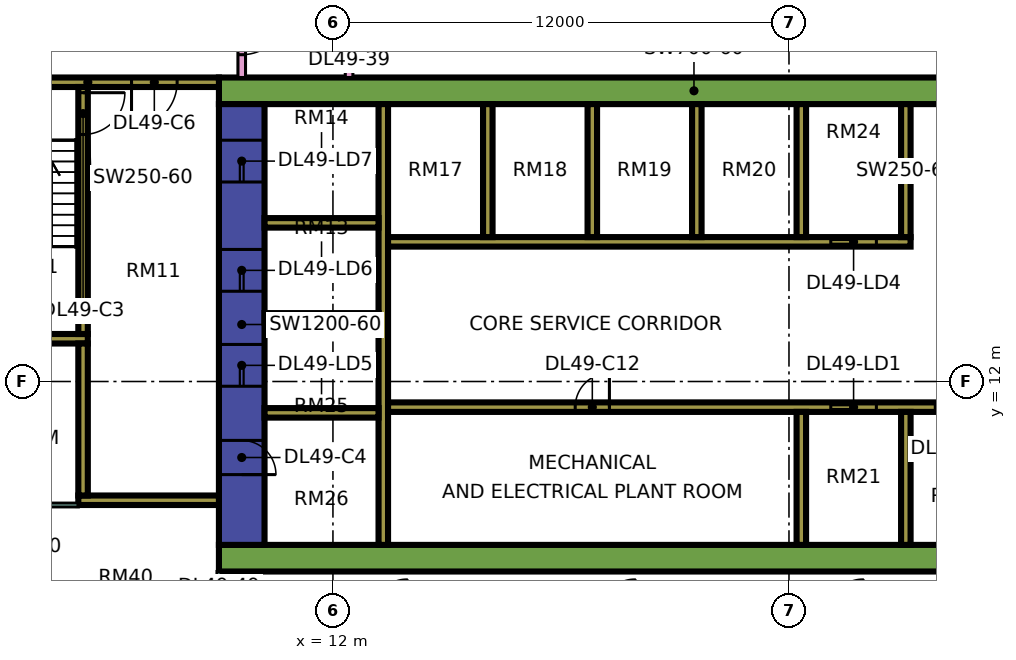
"""IFC4 building model, lengths in metres.
Left out: names, types, materials, properties, quantities, classifications, styles, units other than length and angle.
Written with IfcOpenShell. Run it as: python <this file> out.ifc"""

import sys

from ifc_helpers import new_model, si_unit, direction, frame, frame_2d, origin, place, context, subcontext, project, spatial, rectangle, extrude, element, fill, save


model = new_model("IFC4")
c1 = context("Model", 3, precision=1e-05, world=origin(), true_north=direction((0.0, 1.0)))
c2 = subcontext(c1, "Body", "Model", "MODEL_VIEW")
j1 = project(units=[si_unit("LENGTHUNIT", "METRE"), si_unit("PLANEANGLEUNIT", "RADIAN")], contexts=[c1])
p1 = place(None, origin())
s1 = spatial("IfcSite", under=j1, at=p1, CompositionType="ELEMENT")
p2 = place(p1, origin())
s2 = spatial("IfcBuilding", under=s1, at=p2, CompositionType="ELEMENT")
p3 = place(p2, frame((0.0, 0.0, 211.65)))
s3 = spatial("IfcBuildingStorey", under=s2, at=p3, CompositionType="ELEMENT", Elevation=211.65)
p4 = place(p3, frame((9.0, 7.35, 0.0), z_axis=(0.0, 0.0, 1.0), x_axis=(1.0, 0.0, 0.0)))
e1 = element("IfcWall", 1, at=p4, inside=s3, PredefinedType="SHEAR", context=c2, shape_type="SweptSolid", body=[
    extrude(rectangle(XDim=25.0, YDim=0.7, at=frame_2d((12.5, 0.0))), origin(), (0.0, 0.0, 1.0), 3.75),
])
p5 = place(p3, frame((9.0, 19.65, 0.0), z_axis=(0.0, 0.0, 1.0), x_axis=(1.0, 0.0, 0.0)))
e2 = element("IfcWall", 2, at=p5, inside=s3, PredefinedType="SHEAR", context=c2, shape_type="SweptSolid", body=[
    extrude(rectangle(XDim=25.0, YDim=0.7, at=frame_2d((12.5, 0.0))), origin(), (0.0, 0.0, 1.0), 3.75),
])
p6 = place(p5, frame((19.1, 0.0, 0.0)))
e3 = element("IfcOpeningElement", 3, at=p6, cuts=e2, PredefinedType="OPENING", context=c2, shape_type="SweptSolid", body=[
    extrude(rectangle(XDim=1.8, YDim=2.4, at=frame_2d((0.9, 1.2))), frame((0.0, 0.36, 0.0), z_axis=(0.0, -1.0, 0.0), x_axis=(1.0, 0.0, 0.0)), (0.0, 0.0, 1.0), 0.72),
])
p7 = place(p3, frame((9.6, 7.7, 0.0), z_axis=(0.0, 0.0, 1.0), x_axis=(0.0, 1.0, 0.0)))
e4 = element("IfcWall", 4, at=p7, inside=s3, PredefinedType="SHEAR", context=c2, shape_type="SweptSolid", body=[
    extrude(rectangle(XDim=11.6, YDim=1.2, at=frame_2d((5.8, 0.0))), origin(), (0.0, 0.0, 1.0), 3.75),
])
p8 = place(p7, frame((4.175, 0.0, 0.0)))
e5 = element("IfcOpeningElement", 5, at=p8, cuts=e4, PredefinedType="OPENING", context=c2, shape_type="SweptSolid", body=[
    extrude(rectangle(XDim=1.1, YDim=2.2, at=frame_2d((0.55, 1.1))), frame((0.0, 0.61, 0.0), z_axis=(0.0, -1.0, 0.0), x_axis=(1.0, 0.0, 0.0)), (0.0, 0.0, 1.0), 1.22),
])
p9 = place(p7, frame((6.675, 0.0, 0.0)))
e6 = element("IfcOpeningElement", 6, at=p9, cuts=e4, PredefinedType="OPENING", context=c2, shape_type="SweptSolid", body=[
    extrude(rectangle(XDim=1.1, YDim=2.2, at=frame_2d((0.55, 1.1))), frame((0.0, 0.61, 0.0), z_axis=(0.0, -1.0, 0.0), x_axis=(1.0, 0.0, 0.0)), (0.0, 0.0, 1.0), 1.22),
])
p10 = place(p7, frame((9.55, 0.0, 0.0)))
e7 = element("IfcOpeningElement", 7, at=p10, cuts=e4, PredefinedType="OPENING", context=c2, shape_type="SweptSolid", body=[
    extrude(rectangle(XDim=1.1, YDim=2.2, at=frame_2d((0.55, 1.1))), frame((0.0, 0.61, 0.0), z_axis=(0.0, -1.0, 0.0), x_axis=(1.0, 0.0, 0.0)), (0.0, 0.0, 1.0), 1.22),
])
p11 = place(p7, frame((1.85, 0.0, 0.0)))
e8 = element("IfcOpeningElement", 8, at=p11, cuts=e4, PredefinedType="OPENING", context=c2, shape_type="SweptSolid", body=[
    extrude(rectangle(XDim=0.9, YDim=2.1, at=frame_2d((0.45, 1.05))), frame((0.0, 0.61, 0.0), z_axis=(0.0, -1.0, 0.0), x_axis=(1.0, 0.0, 0.0)), (0.0, 0.0, 1.0), 1.22),
])
p12 = place(p3, frame((13.325, 7.7, 0.0), z_axis=(0.0, 0.0, 1.0), x_axis=(0.0, 1.0, 0.0)))
e9 = element("IfcWall", 9, at=p12, inside=s3, PredefinedType="SHEAR", context=c2, shape_type="SweptSolid", body=[
    extrude(rectangle(XDim=11.6, YDim=0.25, at=frame_2d((5.8, 0.0))), origin(), (0.0, 0.0, 1.0), 3.75),
])
p13 = place(p3, frame((13.45, 11.325, 0.0), z_axis=(0.0, 0.0, 1.0), x_axis=(1.0, 0.0, 0.0)))
e10 = element("IfcWall", 10, at=p13, inside=s3, PredefinedType="SHEAR", context=c2, shape_type="SweptSolid", body=[
    extrude(rectangle(XDim=19.85, YDim=0.25, at=frame_2d((9.925, 0.0))), origin(), (0.0, 0.0, 1.0), 3.75),
])
p14 = place(p13, frame((11.65, 0.0, 0.0)))
e11 = element("IfcOpeningElement", 11, at=p14, cuts=e10, PredefinedType="OPENING", context=c2, shape_type="SweptSolid", body=[
    extrude(rectangle(XDim=1.2, YDim=2.2, at=frame_2d((0.6, 1.1))), frame((0.0, 0.135, 0.0), z_axis=(0.0, -1.0, 0.0), x_axis=(1.0, 0.0, 0.0)), (0.0, 0.0, 1.0), 0.27),
])
p15 = place(p13, frame((14.4, 0.0, 0.0)))
e12 = element("IfcOpeningElement", 12, at=p15, cuts=e10, PredefinedType="OPENING", context=c2, shape_type="SweptSolid", body=[
    extrude(rectangle(XDim=1.2, YDim=2.2, at=frame_2d((0.6, 1.1))), frame((0.0, 0.135, 0.0), z_axis=(0.0, -1.0, 0.0), x_axis=(1.0, 0.0, 0.0)), (0.0, 0.0, 1.0), 0.27),
])
p16 = place(p13, frame((17.15, 0.0, 0.0)))
e13 = element("IfcOpeningElement", 13, at=p16, cuts=e10, PredefinedType="OPENING", context=c2, shape_type="SweptSolid", body=[
    extrude(rectangle(XDim=1.2, YDim=2.2, at=frame_2d((0.6, 1.1))), frame((0.0, 0.135, 0.0), z_axis=(0.0, -1.0, 0.0), x_axis=(1.0, 0.0, 0.0)), (0.0, 0.0, 1.0), 0.27),
])
p17 = place(p13, frame((4.925, 0.0, 0.0)))
e14 = element("IfcOpeningElement", 14, at=p17, cuts=e10, PredefinedType="OPENING", context=c2, shape_type="SweptSolid", body=[
    extrude(rectangle(XDim=0.9, YDim=2.1, at=frame_2d((0.45, 1.05))), frame((0.0, 0.135, 0.0), z_axis=(0.0, -1.0, 0.0), x_axis=(1.0, 0.0, 0.0)), (0.0, 0.0, 1.0), 0.27),
])
p18 = place(p3, frame((13.45, 15.675, 0.0), z_axis=(0.0, 0.0, 1.0), x_axis=(1.0, 0.0, 0.0)))
e15 = element("IfcWall", 15, at=p18, inside=s3, PredefinedType="SHEAR", context=c2, shape_type="SweptSolid", body=[
    extrude(rectangle(XDim=13.75, YDim=0.25, at=frame_2d((6.875, 0.0))), origin(), (0.0, 0.0, 1.0), 3.75),
])
p19 = place(p18, frame((11.65, 0.0, 0.0)))
e16 = element("IfcOpeningElement", 16, at=p19, cuts=e15, PredefinedType="OPENING", context=c2, shape_type="SweptSolid", body=[
    extrude(rectangle(XDim=1.2, YDim=2.2, at=frame_2d((0.6, 1.1))), frame((0.0, 0.135, 0.0), z_axis=(0.0, -1.0, 0.0), x_axis=(1.0, 0.0, 0.0)), (0.0, 0.0, 1.0), 0.27),
])
for number, where, z_axis, x_axis in (
    (17, (10.2, 11.175, 0.0), (0.0, 0.0, 1.0), (1.0, 0.0, 0.0)),
    (18, (10.2, 13.675, 0.0), (0.0, 0.0, 1.0), (1.0, 0.0, 0.0)),
    (19, (10.2, 16.175, 0.0), (0.0, 0.0, 1.0), (1.0, 0.0, 0.0)),
):
    element("IfcWall", number, at=place(p3, frame(where, z_axis=z_axis, x_axis=x_axis)), inside=s3, PredefinedType="SHEAR", context=c2, shape_type="SweptSolid", body=[
        extrude(rectangle(XDim=3.0, YDim=0.25, at=frame_2d((1.5, 0.0))), origin(), (0.0, 0.0, 1.0), 3.75),
    ])
for number, where, z_axis, x_axis in (
    (20, (24.325, 7.7, 0.0), (0.0, 0.0, 1.0), (0.0, 1.0, 0.0)),
    (21, (27.075, 7.7, 0.0), (0.0, 0.0, 1.0), (0.0, 1.0, 0.0)),
    (22, (16.075, 15.8, 0.0), (0.0, 0.0, 1.0), (0.0, 1.0, 0.0)),
    (23, (18.825, 15.8, 0.0), (0.0, 0.0, 1.0), (0.0, 1.0, 0.0)),
    (24, (21.575, 15.8, 0.0), (0.0, 0.0, 1.0), (0.0, 1.0, 0.0)),
    (25, (24.325, 15.8, 0.0), (0.0, 0.0, 1.0), (0.0, 1.0, 0.0)),
    (26, (27.075, 15.8, 0.0), (0.0, 0.0, 1.0), (0.0, 1.0, 0.0)),
):
    element("IfcWall", number, at=place(p3, frame(where, z_axis=z_axis, x_axis=x_axis)), inside=s3, PredefinedType="SHEAR", context=c2, shape_type="SweptSolid", body=[
        extrude(rectangle(XDim=3.5, YDim=0.25, at=frame_2d((1.75, 0.0))), origin(), (0.0, 0.0, 1.0), 3.75),
    ])
p20 = place(p3, frame((2.1, 19.875, 0.0), z_axis=(0.0, 0.0, 1.0), x_axis=(1.0, 0.0, 0.0)))
e27 = element("IfcWall", 27, at=p20, inside=s3, PredefinedType="SHEAR", context=c2, shape_type="SweptSolid", body=[
    extrude(rectangle(XDim=6.9, YDim=0.25, at=frame_2d((3.45, 0.0))), origin(), (0.0, 0.0, 1.0), 3.75),
])
p21 = place(p20, frame((1.175, 0.0, 0.0)))
e28 = element("IfcOpeningElement", 28, at=p21, cuts=e27, PredefinedType="OPENING", context=c2, shape_type="SweptSolid", body=[
    extrude(rectangle(XDim=1.1, YDim=2.2, at=frame_2d((0.55, 1.1))), frame((0.0, 0.135, 0.0), z_axis=(0.0, -1.0, 0.0), x_axis=(1.0, 0.0, 0.0)), (0.0, 0.0, 1.0), 0.27),
])
p22 = place(p20, frame((4.6, 0.0, 0.0)))
e29 = element("IfcOpeningElement", 29, at=p22, cuts=e27, PredefinedType="OPENING", context=c2, shape_type="SweptSolid", body=[
    extrude(rectangle(XDim=1.2, YDim=2.2, at=frame_2d((0.6, 1.1))), frame((0.0, 0.135, 0.0), z_axis=(0.0, -1.0, 0.0), x_axis=(1.0, 0.0, 0.0)), (0.0, 0.0, 1.0), 0.27),
])
p23 = place(p3, frame((2.1, 13.125, 0.0), z_axis=(0.0, 0.0, 1.0), x_axis=(1.0, 0.0, 0.0)))
e30 = element("IfcWall", 30, at=p23, inside=s3, PredefinedType="SHEAR", context=c2, shape_type="SweptSolid", body=[
    extrude(rectangle(XDim=3.45, YDim=0.25, at=frame_2d((1.725, 0.0))), origin(), (0.0, 0.0, 1.0), 3.75),
])
p24 = place(p3, frame((5.425, 13.25, 0.0), z_axis=(0.0, 0.0, 1.0), x_axis=(0.0, 1.0, 0.0)))
e31 = element("IfcWall", 31, at=p24, inside=s3, PredefinedType="SHEAR", context=c2, shape_type="SweptSolid", body=[
    extrude(rectangle(XDim=6.5, YDim=0.25, at=frame_2d((3.25, 0.0))), origin(), (0.0, 0.0, 1.0), 3.75),
])
p25 = place(p24, frame((5.25, 0.0, 0.0)))
e32 = element("IfcOpeningElement", 32, at=p25, cuts=e31, PredefinedType="OPENING", context=c2, shape_type="SweptSolid", body=[
    extrude(rectangle(XDim=1.1, YDim=2.2, at=frame_2d((0.55, 1.1))), frame((0.0, 0.135, 0.0), z_axis=(0.0, -1.0, 0.0), x_axis=(1.0, 0.0, 0.0)), (0.0, 0.0, 1.0), 0.27),
])
p26 = place(p3, frame((5.3, 8.875, 0.0), z_axis=(0.0, 0.0, 1.0), x_axis=(1.0, 0.0, 0.0)))
e33 = element("IfcWall", 33, at=p26, inside=s3, PredefinedType="SHEAR", context=c2, shape_type="SweptSolid", body=[
    extrude(rectangle(XDim=3.7, YDim=0.25, at=frame_2d((1.85, 0.0))), origin(), (0.0, 0.0, 1.0), 3.75),
])
p27 = place(p3, frame((5.425, 9.0, 0.0), z_axis=(0.0, 0.0, 1.0), x_axis=(0.0, 1.0, 0.0)))
e34 = element("IfcWall", 34, at=p27, inside=s3, PredefinedType="SHEAR", context=c2, shape_type="SweptSolid", body=[
    extrude(rectangle(XDim=4.0, YDim=0.25, at=frame_2d((2.0, 0.0))), origin(), (0.0, 0.0, 1.0), 3.75),
])
p28 = place(p3, frame((-1.447, 12.553, 0.0), z_axis=(0.0, 0.0, 1.0), x_axis=(0.707106781187, -0.707106781187, 0.0)))
e35 = element("IfcWall", 35, at=p28, inside=s3, PredefinedType="SOLIDWALL", context=c2, shape_type="SweptSolid", body=[
    extrude(rectangle(XDim=19.799, YDim=0.15, at=frame_2d((9.899, 0.0))), origin(), (0.0, 0.0, 1.0), 3.35),
])
p29 = place(p28, frame((2.212, 0.0, 0.45)))
e36 = element("IfcOpeningElement", 36, at=p29, cuts=e35, PredefinedType="OPENING", context=c2, shape_type="SweptSolid", body=[
    extrude(rectangle(XDim=3.0, YDim=2.4, at=frame_2d((1.5, 1.2))), frame((0.0, 0.085, 0.0), z_axis=(0.0, -1.0, 0.0), x_axis=(1.0, 0.0, 0.0)), (0.0, 0.0, 1.0), 0.17),
])
p30 = place(p28, frame((10.216, 0.0, 0.45)))
e37 = element("IfcOpeningElement", 37, at=p30, cuts=e35, PredefinedType="OPENING", context=c2, shape_type="SweptSolid", body=[
    extrude(rectangle(XDim=3.0, YDim=2.4, at=frame_2d((1.5, 1.2))), frame((0.0, 0.085, 0.0), z_axis=(0.0, -1.0, 0.0), x_axis=(1.0, 0.0, 0.0)), (0.0, 0.0, 1.0), 0.17),
])
p31 = place(p3, frame((2.461, 8.75, 0.0), z_axis=(0.0, 0.0, 1.0), x_axis=(1.0, 0.0, 0.0)))
e38 = element("IfcWall", 38, at=p31, inside=s3, PredefinedType="PARTITIONING", context=c2, shape_type="SweptSolid", body=[
    extrude(rectangle(XDim=2.839, YDim=0.1, at=frame_2d((1.419, 0.0))), origin(), (0.0, 0.0, 1.0), 3.35),
])
p32 = place(p31, frame((0.889, 0.0, 0.0)))
e39 = element("IfcOpeningElement", 39, at=p32, cuts=e38, PredefinedType="OPENING", context=c2, shape_type="SweptSolid", body=[
    extrude(rectangle(XDim=0.9, YDim=2.1, at=frame_2d((0.45, 1.05))), frame((0.0, 0.06, 0.0), z_axis=(0.0, -1.0, 0.0), x_axis=(1.0, 0.0, 0.0)), (0.0, 0.0, 1.0), 0.12),
])
p33 = place(p3, frame((9.0, 3.95, 0.0), z_axis=(0.0, 0.0, 1.0), x_axis=(0.0, 1.0, 0.0)))
e40 = element("IfcWall", 40, at=p33, inside=s3, PredefinedType="PARTITIONING", context=c2, shape_type="SweptSolid", body=[
    extrude(rectangle(XDim=3.05, YDim=0.1, at=frame_2d((1.525, 0.0))), origin(), (0.0, 0.0, 1.0), 3.35),
])
p34 = place(p33, frame((1.1, 0.0, 0.0)))
e41 = element("IfcOpeningElement", 41, at=p34, cuts=e40, PredefinedType="OPENING", context=c2, shape_type="SweptSolid", body=[
    extrude(rectangle(XDim=0.9, YDim=2.1, at=frame_2d((0.45, 1.05))), frame((0.0, 0.06, 0.0), z_axis=(0.0, -1.0, 0.0), x_axis=(1.0, 0.0, 0.0)), (0.0, 0.0, 1.0), 0.12),
])
p35 = place(p3, frame((9.6, 20.0, 0.0), z_axis=(0.0, 0.0, 1.0), x_axis=(0.0, 1.0, 0.0)))
e42 = element("IfcWall", 42, at=p35, inside=s3, PredefinedType="PARTITIONING", context=c2, shape_type="SweptSolid", body=[
    extrude(rectangle(XDim=44.35, YDim=0.2, at=frame_2d((22.175, 0.0))), origin(), (0.0, 0.0, 1.0), 3.35),
])
p36 = place(p35, frame((17.25, 0.0, 0.0)))
e43 = element("IfcOpeningElement", 43, at=p36, cuts=e42, PredefinedType="OPENING", context=c2, shape_type="SweptSolid", body=[
    extrude(rectangle(XDim=1.0, YDim=2.1, at=frame_2d((0.5, 1.05))), frame((0.0, 0.11, 0.0), z_axis=(0.0, -1.0, 0.0), x_axis=(1.0, 0.0, 0.0)), (0.0, 0.0, 1.0), 0.22),
])
p37 = place(p35, frame((0.6, 0.0, 0.0)))
e44 = element("IfcOpeningElement", 44, at=p37, cuts=e42, PredefinedType="OPENING", context=c2, shape_type="SweptSolid", body=[
    extrude(rectangle(XDim=1.2, YDim=2.1, at=frame_2d((0.6, 1.05))), frame((0.0, 0.11, 0.0), z_axis=(0.0, -1.0, 0.0), x_axis=(1.0, 0.0, 0.0)), (0.0, 0.0, 1.0), 0.22),
])
p38 = place(p35, frame((4.35, 0.0, 0.0)))
e45 = element("IfcOpeningElement", 45, at=p38, cuts=e42, PredefinedType="OPENING", context=c2, shape_type="SweptSolid", body=[
    extrude(rectangle(XDim=1.0, YDim=2.1, at=frame_2d((0.5, 1.05))), frame((0.0, 0.11, 0.0), z_axis=(0.0, -1.0, 0.0), x_axis=(1.0, 0.0, 0.0)), (0.0, 0.0, 1.0), 0.22),
])
p39 = place(p3, frame((12.425, 20.0, 0.0), z_axis=(0.0, 0.0, 1.0), x_axis=(0.0, 1.0, 0.0)))
e46 = element("IfcWall", 46, at=p39, inside=s3, PredefinedType="PARTITIONING", context=c2, shape_type="SweptSolid", body=[
    extrude(rectangle(XDim=42.926, YDim=0.2, at=frame_2d((21.463, 0.0))), origin(), (0.0, 0.0, 1.0), 3.35),
])
p40 = place(p39, frame((7.0, 0.0, 0.0)))
e47 = element("IfcOpeningElement", 47, at=p40, cuts=e46, PredefinedType="OPENING", context=c2, shape_type="SweptSolid", body=[
    extrude(rectangle(XDim=1.0, YDim=2.1, at=frame_2d((0.5, 1.05))), frame((0.0, 0.11, 0.0), z_axis=(0.0, -1.0, 0.0), x_axis=(1.0, 0.0, 0.0)), (0.0, 0.0, 1.0), 0.22),
])
p41 = place(p39, frame((12.95, 0.0, 0.0)))
e48 = element("IfcOpeningElement", 48, at=p41, cuts=e46, PredefinedType="OPENING", context=c2, shape_type="SweptSolid", body=[
    extrude(rectangle(XDim=1.0, YDim=2.1, at=frame_2d((0.5, 1.05))), frame((0.0, 0.11, 0.0), z_axis=(0.0, -1.0, 0.0), x_axis=(1.0, 0.0, 0.0)), (0.0, 0.0, 1.0), 0.22),
])
p42 = place(p39, frame((23.35, 0.0, 0.0)))
e49 = element("IfcOpeningElement", 49, at=p42, cuts=e46, PredefinedType="OPENING", context=c2, shape_type="SweptSolid", body=[
    extrude(rectangle(XDim=1.0, YDim=2.1, at=frame_2d((0.5, 1.05))), frame((0.0, 0.11, 0.0), z_axis=(0.0, -1.0, 0.0), x_axis=(1.0, 0.0, 0.0)), (0.0, 0.0, 1.0), 0.22),
])
p43 = place(p39, frame((35.2, 0.0, 0.0)))
e50 = element("IfcOpeningElement", 50, at=p43, cuts=e46, PredefinedType="OPENING", context=c2, shape_type="SweptSolid", body=[
    extrude(rectangle(XDim=1.0, YDim=2.1, at=frame_2d((0.5, 1.05))), frame((0.0, 0.11, 0.0), z_axis=(0.0, -1.0, 0.0), x_axis=(1.0, 0.0, 0.0)), (0.0, 0.0, 1.0), 0.22),
])
p44 = place(p39, frame((1.15, 0.0, 0.0)))
e51 = element("IfcOpeningElement", 51, at=p44, cuts=e46, PredefinedType="OPENING", context=c2, shape_type="SweptSolid", body=[
    extrude(rectangle(XDim=1.8, YDim=2.1, at=frame_2d((0.9, 1.05))), frame((0.0, 0.11, 0.0), z_axis=(0.0, -1.0, 0.0), x_axis=(1.0, 0.0, 0.0)), (0.0, 0.0, 1.0), 0.22),
])
p45 = place(p39, frame((28.6, 0.0, 0.0)))
e52 = element("IfcOpeningElement", 52, at=p45, cuts=e46, PredefinedType="OPENING", context=c2, shape_type="SweptSolid", body=[
    extrude(rectangle(XDim=1.8, YDim=2.1, at=frame_2d((0.9, 1.05))), frame((0.0, 0.11, 0.0), z_axis=(0.0, -1.0, 0.0), x_axis=(1.0, 0.0, 0.0)), (0.0, 0.0, 1.0), 0.22),
])
p46 = place(p14, origin())
e53 = element("IfcDoor", 53, at=p46, inside=s3, OperationType="DOUBLE_DOOR_SLIDING", PredefinedType="DOOR", context=c2, shape_type="SweptSolid", body=[
    extrude(rectangle(XDim=1.2, YDim=2.2, at=frame_2d((0.6, 1.1))), frame((0.0, 0.025, 0.0), z_axis=(0.0, -1.0, 0.0), x_axis=(1.0, 0.0, 0.0)), (0.0, 0.0, 1.0), 0.05),
])
fill(e11, e53)
p47 = place(p15, origin())
e54 = element("IfcDoor", 54, at=p47, inside=s3, OperationType="DOUBLE_DOOR_SLIDING", PredefinedType="DOOR", context=c2, shape_type="SweptSolid", body=[
    extrude(rectangle(XDim=1.2, YDim=2.2, at=frame_2d((0.6, 1.1))), frame((0.0, 0.025, 0.0), z_axis=(0.0, -1.0, 0.0), x_axis=(1.0, 0.0, 0.0)), (0.0, 0.0, 1.0), 0.05),
])
fill(e12, e54)
p48 = place(p19, origin())
e55 = element("IfcDoor", 55, at=p48, inside=s3, OperationType="DOUBLE_DOOR_SLIDING", PredefinedType="DOOR", context=c2, shape_type="SweptSolid", body=[
    extrude(rectangle(XDim=1.2, YDim=2.2, at=frame_2d((0.6, 1.1))), frame((0.0, 0.025, 0.0), z_axis=(0.0, -1.0, 0.0), x_axis=(1.0, 0.0, 0.0)), (0.0, 0.0, 1.0), 0.05),
])
fill(e16, e55)
p49 = place(p8, origin())
e56 = element("IfcDoor", 56, at=p49, inside=s3, OperationType="DOUBLE_DOOR_SLIDING", PredefinedType="DOOR", context=c2, shape_type="SweptSolid", body=[
    extrude(rectangle(XDim=1.1, YDim=2.2, at=frame_2d((0.55, 1.1))), frame((0.0, 0.025, 0.0), z_axis=(0.0, -1.0, 0.0), x_axis=(1.0, 0.0, 0.0)), (0.0, 0.0, 1.0), 0.05),
])
fill(e5, e56)
p50 = place(p9, origin())
e57 = element("IfcDoor", 57, at=p50, inside=s3, OperationType="DOUBLE_DOOR_SLIDING", PredefinedType="DOOR", context=c2, shape_type="SweptSolid", body=[
    extrude(rectangle(XDim=1.1, YDim=2.2, at=frame_2d((0.55, 1.1))), frame((0.0, 0.025, 0.0), z_axis=(0.0, -1.0, 0.0), x_axis=(1.0, 0.0, 0.0)), (0.0, 0.0, 1.0), 0.05),
])
fill(e6, e57)
p51 = place(p10, origin())
e58 = element("IfcDoor", 58, at=p51, inside=s3, OperationType="DOUBLE_DOOR_SLIDING", PredefinedType="DOOR", context=c2, shape_type="SweptSolid", body=[
    extrude(rectangle(XDim=1.1, YDim=2.2, at=frame_2d((0.55, 1.1))), frame((0.0, 0.025, 0.0), z_axis=(0.0, -1.0, 0.0), x_axis=(1.0, 0.0, 0.0)), (0.0, 0.0, 1.0), 0.05),
])
fill(e7, e58)
p52 = place(p25, origin())
e59 = element("IfcDoor", 59, at=p52, inside=s3, OperationType="SINGLE_SWING_RIGHT", PredefinedType="DOOR", context=c2, shape_type="SweptSolid", body=[
    extrude(rectangle(XDim=1.1, YDim=2.2, at=frame_2d((0.55, 1.1))), frame((0.0, 0.025, 0.0), z_axis=(0.0, -1.0, 0.0), x_axis=(1.0, 0.0, 0.0)), (0.0, 0.0, 1.0), 0.05),
])
fill(e32, e59)
p53 = place(p11, frame((0.9, 0.0, 0.0), z_axis=(0.0, 0.0, 1.0), x_axis=(-1.0, 0.0, 0.0)))
e60 = element("IfcDoor", 60, at=p53, inside=s3, OperationType="SINGLE_SWING_LEFT", PredefinedType="DOOR", context=c2, shape_type="SweptSolid", body=[
    extrude(rectangle(XDim=0.9, YDim=2.1, at=frame_2d((0.45, 1.05))), frame((0.0, 0.025, 0.0), z_axis=(0.0, -1.0, 0.0), x_axis=(1.0, 0.0, 0.0)), (0.0, 0.0, 1.0), 0.05),
])
fill(e8, e60)
p54 = place(p22, frame((1.2, 0.0, 0.0), z_axis=(0.0, 0.0, 1.0), x_axis=(-1.0, 0.0, 0.0)))
e61 = element("IfcDoor", 61, at=p54, inside=s3, OperationType="SINGLE_SWING_LEFT", PredefinedType="DOOR", context=c2, shape_type="SweptSolid", body=[
    extrude(rectangle(XDim=1.2, YDim=2.2, at=frame_2d((0.6, 1.1))), frame((0.0, 0.025, 0.0), z_axis=(0.0, -1.0, 0.0), x_axis=(1.0, 0.0, 0.0)), (0.0, 0.0, 1.0), 0.05),
])
fill(e29, e61)
p55 = place(p17, frame((0.9, 0.0, 0.0), z_axis=(0.0, 0.0, 1.0), x_axis=(-1.0, 0.0, 0.0)))
e62 = element("IfcDoor", 62, at=p55, inside=s3, OperationType="SINGLE_SWING_RIGHT", PredefinedType="DOOR", context=c2, shape_type="SweptSolid", body=[
    extrude(rectangle(XDim=0.9, YDim=2.1, at=frame_2d((0.45, 1.05))), frame((0.0, 0.025, 0.0), z_axis=(0.0, -1.0, 0.0), x_axis=(1.0, 0.0, 0.0)), (0.0, 0.0, 1.0), 0.05),
])
fill(e14, e62)
p56 = place(p37, origin())
e63 = element("IfcDoor", 63, at=p56, inside=s3, OperationType="SINGLE_SWING_RIGHT", PredefinedType="DOOR", context=c2, shape_type="SweptSolid", body=[
    extrude(rectangle(XDim=1.2, YDim=2.1, at=frame_2d((0.6, 1.05))), frame((0.0, 0.025, 0.0), z_axis=(0.0, -1.0, 0.0), x_axis=(1.0, 0.0, 0.0)), (0.0, 0.0, 1.0), 0.05),
])
fill(e44, e63)
save(model, sys.argv[1])
